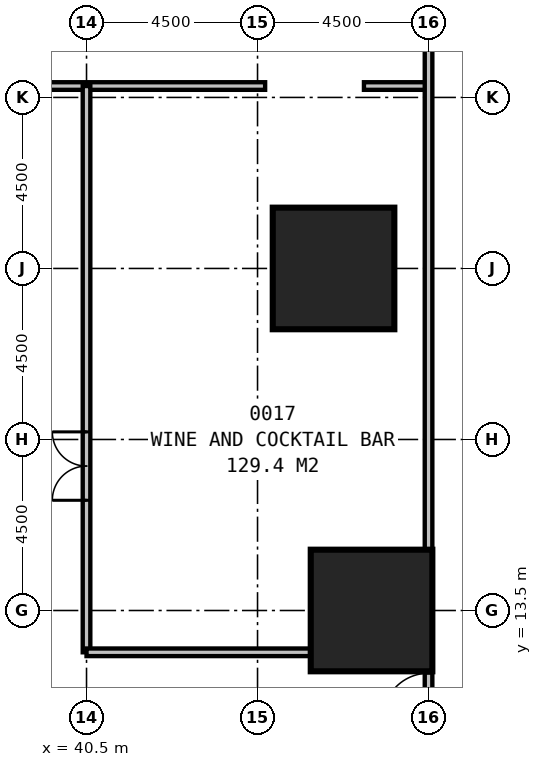
"""IFC4 building model, lengths in metres.
Left out: names, types, materials, properties, quantities, classifications, styles, units other than length and angle.
Written with IfcOpenShell. Run it as: python <this file> out.ifc"""

import sys

from ifc_helpers import new_model, si_unit, direction, frame, frame_2d, origin, origin_2d, place, context, subcontext, project, spatial, rectangle, extrude, element, fill, save


model = new_model("IFC4")
c1 = context("Model", 3, precision=1e-05, world=origin(), true_north=direction((0.0, 1.0)))
c2 = subcontext(c1, "Body", "Model", "MODEL_VIEW")
j1 = project(units=[si_unit("LENGTHUNIT", "METRE"), si_unit("PLANEANGLEUNIT", "RADIAN")], contexts=[c1])
p1 = place(None, origin())
s1 = spatial("IfcSite", under=j1, at=p1, CompositionType="ELEMENT")
p2 = place(p1, origin())
s2 = spatial("IfcBuilding", under=s1, at=p2, CompositionType="ELEMENT")
p3 = place(p2, origin())
s3 = spatial("IfcBuildingStorey", under=s2, at=p3, CompositionType="ELEMENT", Elevation=0.0)
for number, where, z_axis, x_axis in (
    (1, (48.0, 13.5, 0.0), (0.0, 0.0, 1.0), (1.0, 0.0, 0.0)),
    (2, (47.0, 22.5, 0.0), (0.0, 0.0, 1.0), (1.0, 0.0, 0.0)),
):
    element("IfcColumn", number, at=place(p3, frame(where, z_axis=z_axis, x_axis=x_axis)), inside=s3, PredefinedType="COLUMN", context=c2, shape_type="SweptSolid", body=[
        extrude(rectangle(XDim=3.2, YDim=3.2, at=origin_2d()), origin(), (0.0, 0.0, 1.0), 6.0),
    ])
p4 = place(p3, frame((49.5, 10.4, 0.0), z_axis=(0.0, 0.0, 1.0), x_axis=(0.0, 1.0, 0.0)))
e3 = element("IfcWall", 3, at=p4, inside=s3, PredefinedType="PARTITIONING", context=c2, shape_type="SweptSolid", body=[
    extrude(rectangle(XDim=30.1, YDim=0.2, at=frame_2d((15.05, 0.0))), origin(), (0.0, 0.0, 1.0), 5.7),
])
p5 = place(p4, frame((0.25, 0.0, 0.0)))
e4 = element("IfcOpeningElement", 4, at=p5, cuts=e3, PredefinedType="OPENING", context=c2, shape_type="SweptSolid", body=[
    extrude(rectangle(XDim=1.2, YDim=2.1, at=frame_2d((0.6, 1.05))), frame((0.0, 0.11, 0.0), z_axis=(0.0, -1.0, 0.0), x_axis=(1.0, 0.0, 0.0)), (0.0, 0.0, 1.0), 0.22),
])
p6 = place(p3, frame((36.3, 27.3, 0.0), z_axis=(0.0, 0.0, 1.0), x_axis=(1.0, 0.0, 0.0)))
e5 = element("IfcWall", 5, at=p6, inside=s3, PredefinedType="PARTITIONING", context=c2, shape_type="SweptSolid", body=[
    extrude(rectangle(XDim=8.9, YDim=0.2, at=frame_2d((4.45, 0.0))), origin(), (0.0, 0.0, 1.0), 4.4),
])
p7 = place(p6, frame((2.5, 0.0, 0.0), z_axis=(0.0, 0.0, 1.0), x_axis=(-1.0, 0.0, 0.0)))
e6 = element("IfcOpeningElement", 6, at=p7, cuts=e5, PredefinedType="OPENING", context=c2, shape_type="SweptSolid", body=[
    extrude(rectangle(XDim=1.8, YDim=2.4, at=frame_2d((0.9, 1.2))), frame((0.0, 0.11, 0.0), z_axis=(0.0, -1.0, 0.0), x_axis=(1.0, 0.0, 0.0)), (0.0, 0.0, 1.0), 0.22),
])
p8 = place(p3, frame((47.8, 27.3, 0.0), z_axis=(0.0, 0.0, 1.0), x_axis=(1.0, 0.0, 0.0)))
e7 = element("IfcWall", 7, at=p8, inside=s3, PredefinedType="PARTITIONING", context=c2, shape_type="SweptSolid", body=[
    extrude(rectangle(XDim=1.7, YDim=0.2, at=frame_2d((0.85, 0.0))), origin(), (0.0, 0.0, 1.0), 5.7),
])
p9 = place(p3, frame((40.5, 12.4, 0.0), z_axis=(0.0, 0.0, 1.0), x_axis=(0.0, 1.0, 0.0)))
e8 = element("IfcWall", 8, at=p9, inside=s3, PredefinedType="PARTITIONING", context=c2, shape_type="SweptSolid", body=[
    extrude(rectangle(XDim=14.9, YDim=0.2, at=frame_2d((7.45, 0.0))), origin(), (0.0, 0.0, 1.0), 4.7),
])
p10 = place(p9, frame((4.0, 0.0, 0.0)))
e9 = element("IfcOpeningElement", 9, at=p10, cuts=e8, PredefinedType="OPENING", context=c2, shape_type="SweptSolid", body=[
    extrude(rectangle(XDim=1.8, YDim=2.4, at=frame_2d((0.9, 1.2))), frame((0.0, 0.11, 0.0), z_axis=(0.0, -1.0, 0.0), x_axis=(1.0, 0.0, 0.0)), (0.0, 0.0, 1.0), 0.22),
])
p11 = place(p3, frame((40.5, 12.4, 0.0), z_axis=(0.0, 0.0, 1.0), x_axis=(1.0, 0.0, 0.0)))
e10 = element("IfcWall", 10, at=p11, inside=s3, PredefinedType="PARTITIONING", context=c2, shape_type="SweptSolid", body=[
    extrude(rectangle(XDim=6.2, YDim=0.2, at=frame_2d((3.1, 0.0))), origin(), (0.0, 0.0, 1.0), 5.7),
])
p12 = place(p5, origin())
e11 = element("IfcDoor", 11, at=p12, inside=s3, OperationType="SINGLE_SWING_LEFT", PredefinedType="DOOR", context=c2, shape_type="SweptSolid", body=[
    extrude(rectangle(XDim=1.2, YDim=2.1, at=frame_2d((0.6, 1.05))), frame((0.0, 0.025, 0.0), z_axis=(0.0, -1.0, 0.0), x_axis=(1.0, 0.0, 0.0)), (0.0, 0.0, 1.0), 0.05),
])
fill(e4, e11)
p13 = place(p10, origin())
e12 = element("IfcDoor", 12, at=p13, inside=s3, OperationType="DOUBLE_DOOR_SINGLE_SWING", PredefinedType="DOOR", context=c2, shape_type="SweptSolid", body=[
    extrude(rectangle(XDim=1.8, YDim=2.4, at=frame_2d((0.9, 1.2))), frame((0.0, 0.025, 0.0), z_axis=(0.0, -1.0, 0.0), x_axis=(1.0, 0.0, 0.0)), (0.0, 0.0, 1.0), 0.05),
])
fill(e9, e12)
save(model, sys.argv[1])
